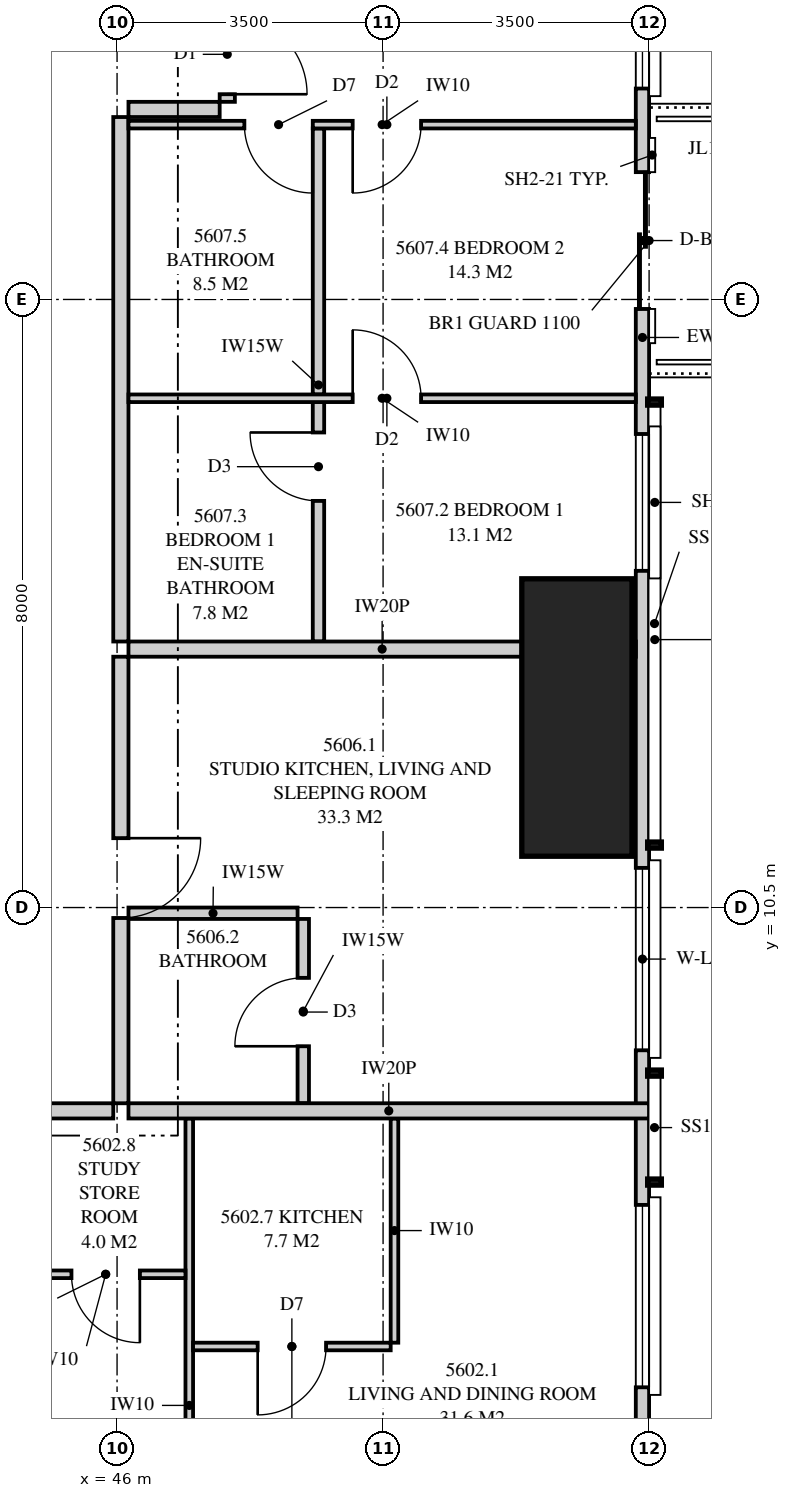
"""IFC4 building model, lengths in metres.
Left out: names, types, materials, properties, quantities, classifications, styles, units other than length and angle.
Written with IfcOpenShell. Run it as: python <this file> out.ifc"""

import sys

from ifc_helpers import new_model, si_unit, direction, frame, frame_2d, origin, origin_2d, place, context, subcontext, project, spatial, polyline, rectangle, outline, extrude, element, fill, save


model = new_model("IFC4")
c1 = context("Model", 3, precision=1e-05, world=origin(), true_north=direction((0.0, 1.0)))
c2 = subcontext(c1, "Body", "Model", "MODEL_VIEW")
j1 = project(units=[si_unit("LENGTHUNIT", "METRE"), si_unit("PLANEANGLEUNIT", "RADIAN")], contexts=[c1])
p1 = place(None, origin())
s1 = spatial("IfcSite", under=j1, at=p1, CompositionType="ELEMENT")
p2 = place(p1, origin())
s2 = spatial("IfcBuilding", under=s1, at=p2, CompositionType="ELEMENT")
p3 = place(p2, frame((0.0, 0.0, 204.6)))
s3 = spatial("IfcBuildingStorey", under=s2, at=p3, CompositionType="ELEMENT", Elevation=204.6)
p4 = place(p3, frame((52.05, 13.0, 0.0), z_axis=(0.0, 0.0, 1.0), x_axis=(1.0, 0.0, 0.0)))
e1 = element("IfcColumn", 1, at=p4, inside=s3, PredefinedType="COLUMN", context=c2, shape_type="SweptSolid", body=[
    extrude(rectangle(XDim=1.45, YDim=3.65, at=origin_2d()), origin(), (0.0, 0.0, 1.0), 3.35),
])
p5 = place(p3, frame((52.913, 3.051, 0.0), z_axis=(0.0, 0.0, 1.0), x_axis=(0.0, 1.0, 0.0)))
e2 = element("IfcWall", 2, at=p5, inside=s3, PredefinedType="SOLIDWALL", context=c2, shape_type="SweptSolid", body=[
    extrude(outline(polyline([(0.0, 0.0), (29.897, 0.0), (29.897, 3.07), (19.763, 3.07), (19.763, 3.01), (19.617, 3.07), (0.0, 3.07), (0.0, 0.0)])), frame((0.0, 0.087, 0.0), z_axis=(0.0, -1.0, 0.0), x_axis=(1.0, 0.0, 0.0)), (0.0, 0.0, 1.0), 0.175),
])
p6 = place(p5, frame((1.137, 0.0, 0.4)))
e3 = element("IfcOpeningElement", 3, at=p6, cuts=e2, PredefinedType="OPENING", context=c2, shape_type="SweptSolid", body=[
    extrude(rectangle(XDim=2.4, YDim=1.7, at=frame_2d((1.2, 0.85))), frame((0.0, 0.097, 0.0), z_axis=(0.0, -1.0, 0.0), x_axis=(1.0, 0.0, 0.0)), (0.0, 0.0, 1.0), 0.195),
])
p7 = place(p5, frame((5.571, 0.0, 0.4)))
e4 = element("IfcOpeningElement", 4, at=p7, cuts=e2, PredefinedType="OPENING", context=c2, shape_type="SweptSolid", body=[
    extrude(rectangle(XDim=2.4, YDim=1.7, at=frame_2d((1.2, 0.85))), frame((0.0, 0.097, 0.0), z_axis=(0.0, -1.0, 0.0), x_axis=(1.0, 0.0, 0.0)), (0.0, 0.0, 1.0), 0.195),
])
p8 = place(p5, frame((11.879, 0.0, 0.4)))
e5 = element("IfcOpeningElement", 5, at=p8, cuts=e2, PredefinedType="OPENING", context=c2, shape_type="SweptSolid", body=[
    extrude(rectangle(XDim=1.8, YDim=1.7, at=frame_2d((0.9, 0.85))), frame((0.0, 0.097, 0.0), z_axis=(0.0, -1.0, 0.0), x_axis=(1.0, 0.0, 0.0)), (0.0, 0.0, 1.0), 0.195),
])
p9 = place(p5, frame((15.324, 0.0, 0.0)))
e6 = element("IfcOpeningElement", 6, at=p9, cuts=e2, PredefinedType="OPENING", context=c2, shape_type="SweptSolid", body=[
    extrude(rectangle(XDim=1.8, YDim=2.1, at=frame_2d((0.9, 1.05))), frame((0.0, 0.097, 0.0), z_axis=(0.0, -1.0, 0.0), x_axis=(1.0, 0.0, 0.0)), (0.0, 0.0, 1.0), 0.195),
])
p10 = place(p5, frame((18.224, 0.0, 0.4)))
e7 = element("IfcOpeningElement", 7, at=p10, cuts=e2, PredefinedType="OPENING", context=c2, shape_type="SweptSolid", body=[
    extrude(rectangle(XDim=1.8, YDim=1.7, at=frame_2d((0.9, 0.85))), frame((0.0, 0.097, 0.0), z_axis=(0.0, -1.0, 0.0), x_axis=(1.0, 0.0, 0.0)), (0.0, 0.0, 1.0), 0.195),
])
p11 = place(p5, frame((27.461, 0.0, 0.4)))
e8 = element("IfcOpeningElement", 8, at=p11, cuts=e2, PredefinedType="OPENING", context=c2, shape_type="SweptSolid", body=[
    extrude(rectangle(XDim=1.2, YDim=1.7, at=frame_2d((0.6, 0.85))), frame((0.0, 0.097, 0.0), z_axis=(0.0, -1.0, 0.0), x_axis=(1.0, 0.0, 0.0)), (0.0, 0.0, 1.0), 0.195),
])
p12 = place(p3, frame((34.3, 7.825, 0.0), z_axis=(0.0, 0.0, 1.0), x_axis=(1.0, 0.0, 0.0)))
e9 = element("IfcWall", 9, at=p12, inside=s3, PredefinedType="PARTITIONING", context=c2, shape_type="SweptSolid", body=[
    extrude(outline(polyline([(0.0, 0.0), (11.65, 0.0), (11.65, 3.07), (9.16, 3.07), (9.16, 2.47), (7.74, 2.47), (7.74, 3.07), (4.282, 3.07), (4.282, 2.491), (3.503, 2.491), (3.503, 3.07), (0.696, 3.07), (0.696, 2.491), (0.0, 2.491), (0.0, 0.0)])), frame((0.0, 0.1, 0.0), z_axis=(0.0, -1.0, 0.0), x_axis=(1.0, 0.0, 0.0)), (0.0, 0.0, 1.0), 0.2),
])
p13 = place(p12, frame((8.8, 0.0, 0.0)))
e10 = element("IfcOpeningElement", 10, at=p13, cuts=e9, PredefinedType="OPENING", context=c2, shape_type="SweptSolid", body=[
    extrude(rectangle(XDim=1.05, YDim=2.2, at=frame_2d((0.525, 1.1))), frame((0.0, 0.11, 0.0), z_axis=(0.0, -1.0, 0.0), x_axis=(1.0, 0.0, 0.0)), (0.0, 0.0, 1.0), 0.22),
])
p14 = place(p3, frame((46.95, 0.175, 0.0), z_axis=(0.0, 0.0, 1.0), x_axis=(0.0, 1.0, 0.0)))
e11 = element("IfcWall", 11, at=p14, inside=s3, PredefinedType="PARTITIONING", context=c2, shape_type="SweptSolid", body=[
    extrude(outline(polyline([(0.0, 0.0), (7.55, 0.0), (7.55, 3.07), (2.035, 3.07), (2.035, 2.07), (1.002, 2.07), (1.002, 3.07), (0.0, 3.07), (0.0, 0.0)])), frame((0.0, 0.05, 0.0), z_axis=(0.0, -1.0, 0.0), x_axis=(1.0, 0.0, 0.0)), (0.0, 0.0, 1.0), 0.1),
])
p15 = place(p14, frame((2.075, 0.0, 0.0)))
e12 = element("IfcOpeningElement", 12, at=p15, cuts=e11, PredefinedType="OPENING", context=c2, shape_type="SweptSolid", body=[
    extrude(rectangle(XDim=0.9, YDim=2.1, at=frame_2d((0.45, 1.05))), frame((0.0, 0.06, 0.0), z_axis=(0.0, -1.0, 0.0), x_axis=(1.0, 0.0, 0.0)), (0.0, 0.0, 1.0), 0.12),
])
p16 = place(p3, frame((47.0, 4.725, 0.0), z_axis=(0.0, 0.0, 1.0), x_axis=(1.0, 0.0, 0.0)))
e13 = element("IfcWall", 13, at=p16, inside=s3, PredefinedType="PARTITIONING", context=c2, shape_type="SweptSolid", body=[
    extrude(rectangle(XDim=2.6, YDim=0.1, at=frame_2d((1.3, 0.0))), origin(), (0.0, 0.0, 1.0), 3.07),
])
p17 = place(p16, frame((0.85, 0.0, 0.0)))
e14 = element("IfcOpeningElement", 14, at=p17, cuts=e13, PredefinedType="OPENING", context=c2, shape_type="SweptSolid", body=[
    extrude(rectangle(XDim=0.9, YDim=2.1, at=frame_2d((0.45, 1.05))), frame((0.0, 0.06, 0.0), z_axis=(0.0, -1.0, 0.0), x_axis=(1.0, 0.0, 0.0)), (0.0, 0.0, 1.0), 0.12),
])
p18 = place(p3, frame((49.65, 4.775, 0.0), z_axis=(0.0, 0.0, 1.0), x_axis=(0.0, 1.0, 0.0)))
e15 = element("IfcWall", 15, at=p18, inside=s3, PredefinedType="PARTITIONING", context=c2, shape_type="SweptSolid", body=[
    extrude(rectangle(XDim=2.95, YDim=0.1, at=frame_2d((1.475, 0.0))), origin(), (0.0, 0.0, 1.0), 3.07),
])
p19 = place(p3, frame((46.15, 7.825, 0.0), z_axis=(0.0, 0.0, 1.0), x_axis=(1.0, 0.0, 0.0)))
e16 = element("IfcWall", 16, at=p19, inside=s3, PredefinedType="PARTITIONING", context=c2, shape_type="SweptSolid", body=[
    extrude(outline(polyline([(0.0, 0.0), (6.85, 0.0), (6.85, 3.07), (5.738, 3.07), (5.738, 2.07), (4.703, 2.07), (4.703, 3.07), (0.0, 3.07), (0.0, 0.0)])), frame((0.0, 0.1, 0.0), z_axis=(0.0, -1.0, 0.0), x_axis=(1.0, 0.0, 0.0)), (0.0, 0.0, 1.0), 0.2),
])
p20 = place(p3, frame((52.825, 13.9, 0.0), z_axis=(0.0, 0.0, 1.0), x_axis=(-1.0, 0.0, 0.0)))
e17 = element("IfcWall", 17, at=p20, inside=s3, PredefinedType="PARTITIONING", context=c2, shape_type="SweptSolid", body=[
    extrude(outline(polyline([(6.675, 0.0), (6.675, 3.07), (1.275, 3.07), (1.275, 2.07), (1.021, 2.07), (1.021, 1.513), (0.529, 1.513), (0.529, 2.07), (0.275, 2.07), (0.275, 3.07), (0.0, 3.07), (0.0, 0.0), (0.529, 0.0), (0.529, 0.636), (1.021, 0.636), (1.021, 0.0), (6.675, 0.0)])), frame((0.0, 0.1, 0.0), z_axis=(0.0, -1.0, 0.0), x_axis=(1.0, 0.0, 0.0)), (0.0, 0.0, 1.0), 0.2),
])
p21 = place(p3, frame((46.05, 7.925, 0.0), z_axis=(0.0, 0.0, 1.0), x_axis=(0.0, 1.0, 0.0)))
e18 = element("IfcWall", 18, at=p21, inside=s3, PredefinedType="PARTITIONING", context=c2, shape_type="SweptSolid", body=[
    extrude(outline(polyline([(0.0, 0.0), (5.875, 0.0), (5.875, 3.07), (5.287, 3.07), (5.287, 2.595), (4.863, 2.595), (4.863, 3.07), (0.0, 3.07), (0.0, 0.0)])), frame((0.0, 0.1, 0.0), z_axis=(0.0, -1.0, 0.0), x_axis=(1.0, 0.0, 0.0)), (0.0, 0.0, 1.0), 0.2),
])
p22 = place(p21, frame((2.438, 0.0, 0.0)))
e19 = element("IfcOpeningElement", 19, at=p22, cuts=e18, PredefinedType="OPENING", context=c2, shape_type="SweptSolid", body=[
    extrude(rectangle(XDim=1.05, YDim=2.2, at=frame_2d((0.525, 1.1))), frame((0.0, 0.11, 0.0), z_axis=(0.0, -1.0, 0.0), x_axis=(1.0, 0.0, 0.0)), (0.0, 0.0, 1.0), 0.22),
])
p23 = place(p3, frame((48.45, 7.925, 0.0), z_axis=(0.0, 0.0, 1.0), x_axis=(0.0, 1.0, 0.0)))
e20 = element("IfcWall", 20, at=p23, inside=s3, PredefinedType="PLUMBINGWALL", context=c2, shape_type="SweptSolid", body=[
    extrude(rectangle(XDim=2.425, YDim=0.15, at=frame_2d((1.212, 0.0))), origin(), (0.0, 0.0, 1.0), 3.07),
])
p24 = place(p23, frame((0.75, 0.0, 0.0)))
e21 = element("IfcOpeningElement", 21, at=p24, cuts=e20, PredefinedType="OPENING", context=c2, shape_type="SweptSolid", body=[
    extrude(rectangle(XDim=0.9, YDim=2.1, at=frame_2d((0.45, 1.05))), frame((0.0, 0.085, 0.0), z_axis=(0.0, -1.0, 0.0), x_axis=(1.0, 0.0, 0.0)), (0.0, 0.0, 1.0), 0.17),
])
p25 = place(p3, frame((48.375, 10.425, 0.0), z_axis=(0.0, 0.0, 1.0), x_axis=(-1.0, 0.0, 0.0)))
e22 = element("IfcWall", 22, at=p25, inside=s3, PredefinedType="PLUMBINGWALL", context=c2, shape_type="SweptSolid", body=[
    extrude(rectangle(XDim=2.225, YDim=0.15, at=frame_2d((1.113, 0.0))), origin(), (0.0, 0.0, 1.0), 3.07),
])
p26 = place(p3, frame((46.05, 14.0, 0.0), z_axis=(0.0, 0.0, 1.0), x_axis=(0.0, 1.0, 0.0)))
e23 = element("IfcWall", 23, at=p26, inside=s3, PredefinedType="PARTITIONING", context=c2, shape_type="SweptSolid", body=[
    extrude(rectangle(XDim=6.9, YDim=0.2, at=frame_2d((3.45, 0.0))), origin(), (0.0, 0.0, 1.0), 3.07),
])
p27 = place(p3, frame((52.825, 17.2, 0.0), z_axis=(0.0, 0.0, 1.0), x_axis=(-1.0, 0.0, 0.0)))
e24 = element("IfcWall", 24, at=p27, inside=s3, PredefinedType="PARTITIONING", context=c2, shape_type="SweptSolid", body=[
    extrude(outline(polyline([(0.0, 0.0), (6.675, 0.0), (6.675, 3.07), (1.275, 3.07), (1.275, 2.07), (0.275, 2.07), (0.275, 3.07), (0.0, 3.07), (0.0, 0.0)])), frame((0.0, 0.05, 0.0), z_axis=(0.0, -1.0, 0.0), x_axis=(1.0, 0.0, 0.0)), (0.0, 0.0, 1.0), 0.1),
])
p28 = place(p27, frame((2.825, 0.0, 0.0)))
e25 = element("IfcOpeningElement", 25, at=p28, cuts=e24, PredefinedType="OPENING", context=c2, shape_type="SweptSolid", body=[
    extrude(rectangle(XDim=0.9, YDim=2.1, at=frame_2d((0.45, 1.05))), frame((0.0, 0.06, 0.0), z_axis=(0.0, -1.0, 0.0), x_axis=(1.0, 0.0, 0.0)), (0.0, 0.0, 1.0), 0.12),
])
p29 = place(p3, frame((52.825, 20.8, 0.0), z_axis=(0.0, 0.0, 1.0), x_axis=(-1.0, 0.0, 0.0)))
e26 = element("IfcWall", 26, at=p29, inside=s3, PredefinedType="PARTITIONING", context=c2, shape_type="SweptSolid", body=[
    extrude(outline(polyline([(0.0, 0.0), (6.675, 0.0), (6.675, 3.07), (1.275, 3.07), (1.275, 2.07), (0.275, 2.07), (0.275, 3.07), (0.0, 3.07), (0.0, 0.0)])), frame((0.0, 0.05, 0.0), z_axis=(0.0, -1.0, 0.0), x_axis=(1.0, 0.0, 0.0)), (0.0, 0.0, 1.0), 0.1),
])
p30 = place(p29, frame((2.825, 0.0, 0.0)))
e27 = element("IfcOpeningElement", 27, at=p30, cuts=e26, PredefinedType="OPENING", context=c2, shape_type="SweptSolid", body=[
    extrude(rectangle(XDim=0.9, YDim=2.1, at=frame_2d((0.45, 1.05))), frame((0.0, 0.06, 0.0), z_axis=(0.0, -1.0, 0.0), x_axis=(1.0, 0.0, 0.0)), (0.0, 0.0, 1.0), 0.12),
])
p31 = place(p29, frame((4.25, 0.0, 0.0)))
e28 = element("IfcOpeningElement", 28, at=p31, cuts=e26, PredefinedType="OPENING", context=c2, shape_type="SweptSolid", body=[
    extrude(rectangle(XDim=0.9, YDim=2.1, at=frame_2d((0.45, 1.05))), frame((0.0, 0.06, 0.0), z_axis=(0.0, -1.0, 0.0), x_axis=(1.0, 0.0, 0.0)), (0.0, 0.0, 1.0), 0.12),
])
p32 = place(p3, frame((48.65, 14.0, 0.0), z_axis=(0.0, 0.0, 1.0), x_axis=(0.0, 1.0, 0.0)))
e29 = element("IfcWall", 29, at=p32, inside=s3, PredefinedType="PLUMBINGWALL", context=c2, shape_type="SweptSolid", body=[
    extrude(rectangle(XDim=3.15, YDim=0.15, at=frame_2d((1.575, 0.0))), origin(), (0.0, 0.0, 1.0), 3.07),
])
p33 = place(p32, frame((1.85, 0.0, 0.0)))
e30 = element("IfcOpeningElement", 30, at=p33, cuts=e29, PredefinedType="OPENING", context=c2, shape_type="SweptSolid", body=[
    extrude(rectangle(XDim=0.9, YDim=2.1, at=frame_2d((0.45, 1.05))), frame((0.0, 0.085, 0.0), z_axis=(0.0, -1.0, 0.0), x_axis=(1.0, 0.0, 0.0)), (0.0, 0.0, 1.0), 0.17),
])
p34 = place(p3, frame((48.65, 17.25, 0.0), z_axis=(0.0, 0.0, 1.0), x_axis=(0.0, 1.0, 0.0)))
e31 = element("IfcWall", 31, at=p34, inside=s3, PredefinedType="PLUMBINGWALL", context=c2, shape_type="SweptSolid", body=[
    extrude(rectangle(XDim=3.5, YDim=0.15, at=frame_2d((1.75, 0.0))), origin(), (0.0, 0.0, 1.0), 3.07),
])
p35 = place(p3, frame((47.45, 21.1, 0.0), z_axis=(0.0, 0.0, 1.0), x_axis=(0.0, 1.0, 0.0)))
e32 = element("IfcWall", 32, at=p35, inside=s3, PredefinedType="PARTITIONING", context=c2, shape_type="SweptSolid", body=[
    extrude(rectangle(XDim=2.4, YDim=0.2, at=frame_2d((1.2, 0.0))), origin(), (0.0, 0.0, 1.0), 3.07),
])
p36 = place(p35, frame((0.1, 0.0, 0.0)))
e33 = element("IfcOpeningElement", 33, at=p36, cuts=e32, PredefinedType="OPENING", context=c2, shape_type="SweptSolid", body=[
    extrude(rectangle(XDim=1.05, YDim=2.2, at=frame_2d((0.525, 1.1))), frame((0.0, 0.11, 0.0), z_axis=(0.0, -1.0, 0.0), x_axis=(1.0, 0.0, 0.0)), (0.0, 0.0, 1.0), 0.22),
])
p37 = place(p3, frame((46.15, 21.0, 0.0), z_axis=(0.0, 0.0, 1.0), x_axis=(1.0, 0.0, 0.0)))
e34 = element("IfcWall", 34, at=p37, inside=s3, PredefinedType="PARTITIONING", context=c2, shape_type="SweptSolid", body=[
    extrude(rectangle(XDim=1.2, YDim=0.2, at=frame_2d((0.6, 0.0))), origin(), (0.0, 0.0, 1.0), 3.07),
])
p38 = place(p3, frame((46.9, 5.675, 0.0), z_axis=(0.0, 0.0, 1.0), x_axis=(-1.0, 0.0, 0.0)))
e35 = element("IfcWall", 35, at=p38, inside=s3, PredefinedType="PARTITIONING", context=c2, shape_type="SweptSolid", body=[
    extrude(rectangle(XDim=2.1, YDim=0.1, at=frame_2d((1.05, 0.0))), origin(), (0.0, 0.0, 1.0), 3.07),
])
p39 = place(p38, frame((0.6, 0.0, 0.0)))
e36 = element("IfcOpeningElement", 36, at=p39, cuts=e35, PredefinedType="OPENING", context=c2, shape_type="SweptSolid", body=[
    extrude(rectangle(XDim=0.9, YDim=2.1, at=frame_2d((0.45, 1.05))), frame((0.0, 0.06, 0.0), z_axis=(0.0, -1.0, 0.0), x_axis=(1.0, 0.0, 0.0)), (0.0, 0.0, 1.0), 0.12),
])
p40 = place(p6, origin())
e37 = element("IfcWindow", 37, at=p40, inside=s3, PartitioningType="SINGLE_PANEL", PredefinedType="WINDOW", context=c2, shape_type="SweptSolid", body=[
    extrude(rectangle(XDim=2.4, YDim=1.7, at=frame_2d((1.2, 0.85))), frame((0.0, 0.03, 0.0), z_axis=(0.0, -1.0, 0.0), x_axis=(1.0, 0.0, 0.0)), (0.0, 0.0, 1.0), 0.06),
])
fill(e3, e37)
p41 = place(p7, origin())
e38 = element("IfcWindow", 38, at=p41, inside=s3, PartitioningType="SINGLE_PANEL", PredefinedType="WINDOW", context=c2, shape_type="SweptSolid", body=[
    extrude(rectangle(XDim=2.4, YDim=1.7, at=frame_2d((1.2, 0.85))), frame((0.0, 0.03, 0.0), z_axis=(0.0, -1.0, 0.0), x_axis=(1.0, 0.0, 0.0)), (0.0, 0.0, 1.0), 0.06),
])
fill(e4, e38)
p42 = place(p8, origin())
e39 = element("IfcWindow", 39, at=p42, inside=s3, PartitioningType="SINGLE_PANEL", PredefinedType="WINDOW", context=c2, shape_type="SweptSolid", body=[
    extrude(rectangle(XDim=1.8, YDim=1.7, at=frame_2d((0.9, 0.85))), frame((0.0, 0.03, 0.0), z_axis=(0.0, -1.0, 0.0), x_axis=(1.0, 0.0, 0.0)), (0.0, 0.0, 1.0), 0.06),
])
fill(e5, e39)
p43 = place(p9, origin())
e40 = element("IfcDoor", 40, at=p43, inside=s3, OperationType="SLIDING_TO_LEFT", PredefinedType="DOOR", context=c2, shape_type="SweptSolid", body=[
    extrude(rectangle(XDim=1.8, YDim=2.1, at=frame_2d((0.9, 1.05))), frame((0.0, 0.025, 0.0), z_axis=(0.0, -1.0, 0.0), x_axis=(1.0, 0.0, 0.0)), (0.0, 0.0, 1.0), 0.05),
])
fill(e6, e40)
p44 = place(p10, origin())
e41 = element("IfcWindow", 41, at=p44, inside=s3, PartitioningType="SINGLE_PANEL", PredefinedType="WINDOW", context=c2, shape_type="SweptSolid", body=[
    extrude(rectangle(XDim=1.8, YDim=1.7, at=frame_2d((0.9, 0.85))), frame((0.0, 0.03, 0.0), z_axis=(0.0, -1.0, 0.0), x_axis=(1.0, 0.0, 0.0)), (0.0, 0.0, 1.0), 0.06),
])
fill(e7, e41)
p45 = place(p17, frame((0.9, 0.0, 0.0), z_axis=(0.0, 0.0, 1.0), x_axis=(-1.0, 0.0, 0.0)))
e42 = element("IfcDoor", 42, at=p45, inside=s3, OperationType="SINGLE_SWING_RIGHT", PredefinedType="DOOR", context=c2, shape_type="SweptSolid", body=[
    extrude(rectangle(XDim=0.9, YDim=2.1, at=frame_2d((0.45, 1.05))), frame((0.0, 0.025, 0.0), z_axis=(0.0, -1.0, 0.0), x_axis=(1.0, 0.0, 0.0)), (0.0, 0.0, 1.0), 0.05),
])
fill(e14, e42)
p46 = place(p22, frame((1.05, 0.0, 0.0), z_axis=(0.0, 0.0, 1.0), x_axis=(-1.0, 0.0, 0.0)))
e43 = element("IfcDoor", 43, at=p46, inside=s3, OperationType="SINGLE_SWING_LEFT", PredefinedType="DOOR", context=c2, shape_type="SweptSolid", body=[
    extrude(rectangle(XDim=1.05, YDim=2.2, at=frame_2d((0.525, 1.1))), frame((0.0, 0.025, 0.0), z_axis=(0.0, -1.0, 0.0), x_axis=(1.0, 0.0, 0.0)), (0.0, 0.0, 1.0), 0.05),
])
fill(e19, e43)
p47 = place(p24, origin())
e44 = element("IfcDoor", 44, at=p47, inside=s3, OperationType="SINGLE_SWING_LEFT", PredefinedType="DOOR", context=c2, shape_type="SweptSolid", body=[
    extrude(rectangle(XDim=0.9, YDim=2.1, at=frame_2d((0.45, 1.05))), frame((0.0, 0.025, 0.0), z_axis=(0.0, -1.0, 0.0), x_axis=(1.0, 0.0, 0.0)), (0.0, 0.0, 1.0), 0.05),
])
fill(e21, e44)
p48 = place(p36, frame((1.05, 0.0, 0.0), z_axis=(0.0, 0.0, 1.0), x_axis=(-1.0, 0.0, 0.0)))
e45 = element("IfcDoor", 45, at=p48, inside=s3, OperationType="SINGLE_SWING_RIGHT", PredefinedType="DOOR", context=c2, shape_type="SweptSolid", body=[
    extrude(rectangle(XDim=1.05, YDim=2.2, at=frame_2d((0.525, 1.1))), frame((0.0, 0.025, 0.0), z_axis=(0.0, -1.0, 0.0), x_axis=(1.0, 0.0, 0.0)), (0.0, 0.0, 1.0), 0.05),
])
fill(e33, e45)
p49 = place(p28, frame((0.9, 0.0, 0.0), z_axis=(0.0, 0.0, 1.0), x_axis=(-1.0, 0.0, 0.0)))
e46 = element("IfcDoor", 46, at=p49, inside=s3, OperationType="SINGLE_SWING_LEFT", PredefinedType="DOOR", context=c2, shape_type="SweptSolid", body=[
    extrude(rectangle(XDim=0.9, YDim=2.1, at=frame_2d((0.45, 1.05))), frame((0.0, 0.025, 0.0), z_axis=(0.0, -1.0, 0.0), x_axis=(1.0, 0.0, 0.0)), (0.0, 0.0, 1.0), 0.05),
])
fill(e25, e46)
p50 = place(p33, origin())
e47 = element("IfcDoor", 47, at=p50, inside=s3, OperationType="SINGLE_SWING_RIGHT", PredefinedType="DOOR", context=c2, shape_type="SweptSolid", body=[
    extrude(rectangle(XDim=0.9, YDim=2.1, at=frame_2d((0.45, 1.05))), frame((0.0, 0.025, 0.0), z_axis=(0.0, -1.0, 0.0), x_axis=(1.0, 0.0, 0.0)), (0.0, 0.0, 1.0), 0.05),
])
fill(e30, e47)
p51 = place(p30, origin())
e48 = element("IfcDoor", 48, at=p51, inside=s3, OperationType="SINGLE_SWING_RIGHT", PredefinedType="DOOR", context=c2, shape_type="SweptSolid", body=[
    extrude(rectangle(XDim=0.9, YDim=2.1, at=frame_2d((0.45, 1.05))), frame((0.0, 0.025, 0.0), z_axis=(0.0, -1.0, 0.0), x_axis=(1.0, 0.0, 0.0)), (0.0, 0.0, 1.0), 0.05),
])
fill(e27, e48)
p52 = place(p31, origin())
e49 = element("IfcDoor", 49, at=p52, inside=s3, OperationType="SINGLE_SWING_LEFT", PredefinedType="DOOR", context=c2, shape_type="SweptSolid", body=[
    extrude(rectangle(XDim=0.9, YDim=2.1, at=frame_2d((0.45, 1.05))), frame((0.0, 0.025, 0.0), z_axis=(0.0, -1.0, 0.0), x_axis=(1.0, 0.0, 0.0)), (0.0, 0.0, 1.0), 0.05),
])
fill(e28, e49)
p53 = place(p39, origin())
e50 = element("IfcDoor", 50, at=p53, inside=s3, OperationType="SINGLE_SWING_LEFT", PredefinedType="DOOR", context=c2, shape_type="SweptSolid", body=[
    extrude(rectangle(XDim=0.9, YDim=2.1, at=frame_2d((0.45, 1.05))), frame((0.0, 0.025, 0.0), z_axis=(0.0, -1.0, 0.0), x_axis=(1.0, 0.0, 0.0)), (0.0, 0.0, 1.0), 0.05),
])
fill(e36, e50)
save(model, sys.argv[1])
